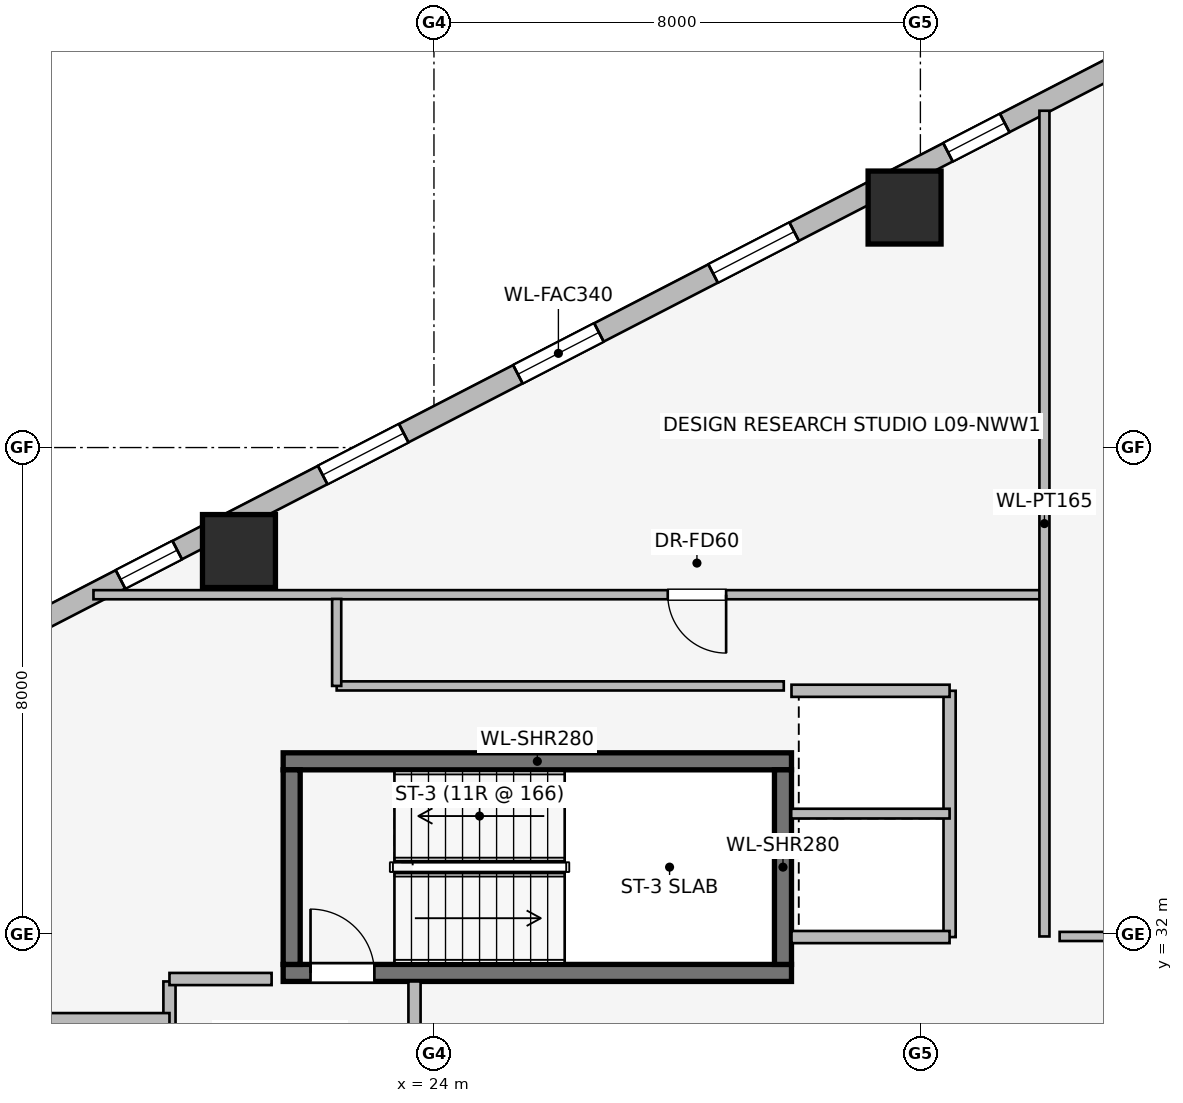
"""IFC4 building model, lengths in metres.
Left out: names, types, materials, properties, quantities, classifications, styles, units other than length and angle.
Written with IfcOpenShell. Run it as: python <this file> out.ifc"""

import sys

from ifc_helpers import new_model, si_unit, direction, frame, frame_2d, origin, origin_2d, place, context, subcontext, project, spatial, rectangle, extrude, element, fill, save


model = new_model("IFC4")
c1 = context("Model", 3, precision=1e-05, world=origin(), true_north=direction((0.0, 1.0)))
c2 = subcontext(c1, "Body", "Model", "MODEL_VIEW")
j1 = project(units=[si_unit("LENGTHUNIT", "METRE"), si_unit("PLANEANGLEUNIT", "RADIAN")], contexts=[c1])
p1 = place(None, origin())
s1 = spatial("IfcSite", under=j1, at=p1, CompositionType="ELEMENT")
p2 = place(p1, origin())
s2 = spatial("IfcBuilding", under=s1, at=p2, CompositionType="ELEMENT")
p3 = place(p2, frame((0.0, 0.0, 37.95)))
s3 = spatial("IfcBuildingStorey", under=s2, at=p3, CompositionType="ELEMENT", Elevation=37.95)
p4 = place(p3, frame((21.52, 31.36, 0.0), z_axis=(0.0, 0.0, 1.0), x_axis=(1.0, 0.0, 0.0)))
e1 = element("IfcWall", 1, at=p4, inside=s3, PredefinedType="SHEAR", context=c2, shape_type="SweptSolid", body=[
    extrude(rectangle(XDim=8.36, YDim=0.28, at=frame_2d((4.18, 0.0))), origin(), (0.0, 0.0, 1.0), 3.65),
])
p5 = place(p4, frame((0.45, 0.0, 0.0)))
e2 = element("IfcOpeningElement", 2, at=p5, cuts=e1, PredefinedType="OPENING", context=c2, shape_type="SweptSolid", body=[
    extrude(rectangle(XDim=1.05, YDim=2.0, at=frame_2d((0.525, 1.0))), frame((0.0, 0.15, 0.0), z_axis=(0.0, -1.0, 0.0), x_axis=(1.0, 0.0, 0.0)), (0.0, 0.0, 1.0), 0.3),
])
p6 = place(p3, frame((29.88, 34.84, 0.0), z_axis=(0.0, 0.0, 1.0), x_axis=(-1.0, 0.0, 0.0)))
e3 = element("IfcWall", 3, at=p6, inside=s3, PredefinedType="SHEAR", context=c2, shape_type="SweptSolid", body=[
    extrude(rectangle(XDim=8.36, YDim=0.28, at=frame_2d((4.18, 0.0))), origin(), (0.0, 0.0, 1.0), 3.65),
])
for number, where, z_axis, x_axis in (
    (4, (21.66, 34.7, 0.0), (0.0, 0.0, 1.0), (0.0, -1.0, 0.0)),
    (5, (29.74, 31.5, 0.0), (0.0, 0.0, 1.0), (0.0, 1.0, 0.0)),
):
    element("IfcWall", number, at=place(p3, frame(where, z_axis=z_axis, x_axis=x_axis)), inside=s3, PredefinedType="SHEAR", context=c2, shape_type="SweptSolid", body=[
        extrude(rectangle(XDim=3.2, YDim=0.28, at=frame_2d((1.6, 0.0))), origin(), (0.0, 0.0, 1.0), 3.65),
    ])
for number, where, z_axis, x_axis in (
    (6, (31.74, 43.947, 0.0), (0.0, 0.0, 1.0), (1.0, 0.0, 0.0)),
    (7, (20.793, 38.298, 0.0), (0.0, 0.0, 1.0), (1.0, 0.0, 0.0)),
):
    element("IfcColumn", number, at=place(p3, frame(where, z_axis=z_axis, x_axis=x_axis)), inside=s3, PredefinedType="COLUMN", context=c2, shape_type="SweptSolid", body=[
        extrude(rectangle(XDim=1.2, YDim=1.2, at=origin_2d()), origin(), (0.0, 0.0, 1.0), 3.65),
    ])
p7 = place(p3, frame((16.924, 36.841, 0.0), z_axis=(0.0, 0.0, 1.0), x_axis=(0.888634413993, 0.458616264721, 0.0)))
e8 = element("IfcWall", 8, at=p7, inside=s3, PredefinedType="STANDARD", context=c2, shape_type="SweptSolid", body=[
    extrude(rectangle(XDim=20.531, YDim=0.34, at=frame_2d((10.266, 0.0))), origin(), (0.0, 0.0, 1.0), 2.684),
])
p8 = place(p7, frame((2.161, 0.0, 0.75)))
e9 = element("IfcOpeningElement", 9, at=p8, cuts=e8, PredefinedType="OPENING", context=c2, shape_type="SweptSolid", body=[
    extrude(rectangle(XDim=1.05, YDim=1.4, at=frame_2d((0.525, 0.7))), frame((0.0, 0.18, 0.0), z_axis=(0.0, -1.0, 0.0), x_axis=(1.0, 0.0, 0.0)), (0.0, 0.0, 1.0), 0.36),
])
p9 = place(p7, frame((5.903, 0.0, 0.75)))
e10 = element("IfcOpeningElement", 10, at=p9, cuts=e8, PredefinedType="OPENING", context=c2, shape_type="SweptSolid", body=[
    extrude(rectangle(XDim=1.5, YDim=1.5, at=frame_2d((0.75, 0.75))), frame((0.0, 0.18, 0.0), z_axis=(0.0, -1.0, 0.0), x_axis=(1.0, 0.0, 0.0)), (0.0, 0.0, 1.0), 0.36),
])
p10 = place(p7, frame((9.516, 0.0, 0.75)))
e11 = element("IfcOpeningElement", 11, at=p10, cuts=e8, PredefinedType="OPENING", context=c2, shape_type="SweptSolid", body=[
    extrude(rectangle(XDim=1.5, YDim=1.5, at=frame_2d((0.75, 0.75))), frame((0.0, 0.18, 0.0), z_axis=(0.0, -1.0, 0.0), x_axis=(1.0, 0.0, 0.0)), (0.0, 0.0, 1.0), 0.36),
])
p11 = place(p7, frame((13.129, 0.0, 0.75)))
e12 = element("IfcOpeningElement", 12, at=p11, cuts=e8, PredefinedType="OPENING", context=c2, shape_type="SweptSolid", body=[
    extrude(rectangle(XDim=1.5, YDim=1.5, at=frame_2d((0.75, 0.75))), frame((0.0, 0.18, 0.0), z_axis=(0.0, -1.0, 0.0), x_axis=(1.0, 0.0, 0.0)), (0.0, 0.0, 1.0), 0.36),
])
p12 = place(p7, frame((17.476, 0.0, 0.75)))
e13 = element("IfcOpeningElement", 13, at=p12, cuts=e8, PredefinedType="OPENING", context=c2, shape_type="SweptSolid", body=[
    extrude(rectangle(XDim=1.05, YDim=1.4, at=frame_2d((0.525, 0.7))), frame((0.0, 0.18, 0.0), z_axis=(0.0, -1.0, 0.0), x_axis=(1.0, 0.0, 0.0)), (0.0, 0.0, 1.0), 0.36),
])
p13 = place(p3, frame((19.65, 25.68, 0.0), z_axis=(0.0, 0.0, 1.0), x_axis=(0.0, 1.0, 0.0)))
e14 = element("IfcWall", 14, at=p13, inside=s3, PredefinedType="PARTITIONING", context=c2, shape_type="SweptSolid", body=[
    extrude(rectangle(XDim=5.54, YDim=0.2, at=frame_2d((2.77, 0.0))), origin(), (0.0, 0.0, 1.0), 3.39),
])
p14 = place(p13, frame((0.62, 0.0, 0.0)))
e15 = element("IfcOpeningElement", 15, at=p14, cuts=e14, PredefinedType="OPENING", context=c2, shape_type="SweptSolid", body=[
    extrude(rectangle(XDim=1.1, YDim=2.2, at=frame_2d((0.55, 1.1))), frame((0.0, 0.11, 0.0), z_axis=(0.0, -1.0, 0.0), x_axis=(1.0, 0.0, 0.0)), (0.0, 0.0, 1.0), 0.22),
])
p15 = place(p13, frame((3.12, 0.0, 0.0)))
e16 = element("IfcOpeningElement", 16, at=p15, cuts=e14, PredefinedType="OPENING", context=c2, shape_type="SweptSolid", body=[
    extrude(rectangle(XDim=1.1, YDim=2.2, at=frame_2d((0.55, 1.1))), frame((0.0, 0.11, 0.0), z_axis=(0.0, -1.0, 0.0), x_axis=(1.0, 0.0, 0.0)), (0.0, 0.0, 1.0), 0.22),
])
p16 = place(p3, frame((23.68, 25.68, 0.0), z_axis=(0.0, 0.0, 1.0), x_axis=(0.0, 1.0, 0.0)))
e17 = element("IfcWall", 17, at=p16, inside=s3, PredefinedType="PARTITIONING", context=c2, shape_type="SweptSolid", body=[
    extrude(rectangle(XDim=5.54, YDim=0.2, at=frame_2d((2.77, 0.0))), origin(), (0.0, 0.0, 1.0), 3.39),
])
p17 = place(p16, frame((1.8, 0.0, 0.0)))
e18 = element("IfcOpeningElement", 18, at=p17, cuts=e17, PredefinedType="OPENING", context=c2, shape_type="SweptSolid", body=[
    extrude(rectangle(XDim=1.05, YDim=2.0, at=frame_2d((0.525, 1.0))), frame((0.0, 0.11, 0.0), z_axis=(0.0, -1.0, 0.0), x_axis=(1.0, 0.0, 0.0)), (0.0, 0.0, 1.0), 0.22),
])
p18 = place(p3, frame((21.33, 31.26, 0.0), z_axis=(0.0, 0.0, 1.0), x_axis=(-1.0, 0.0, 0.0)))
e19 = element("IfcWall", 19, at=p18, inside=s3, PredefinedType="PARTITIONING", context=c2, shape_type="SweptSolid", body=[
    extrude(rectangle(XDim=1.68, YDim=0.2, at=frame_2d((0.84, 0.0))), origin(), (0.0, 0.0, 1.0), 3.39),
])
p19 = place(p3, frame((19.65, 30.6, 0.0), z_axis=(0.0, 0.0, 1.0), x_axis=(-1.0, 0.0, 0.0)))
e20 = element("IfcWall", 20, at=p19, inside=s3, PredefinedType="PARTITIONING", context=c2, shape_type="SweptSolid", body=[
    extrude(rectangle(XDim=2.5, YDim=0.2, at=frame_2d((1.25, 0.0))), origin(), (0.0, 0.0, 1.0), 2.29),
])
p20 = place(p3, frame((32.48, 31.95, 0.0), z_axis=(0.0, 0.0, 1.0), x_axis=(0.0, 1.0, 0.0)))
e21 = element("IfcWall", 21, at=p20, inside=s3, PredefinedType="PARTITIONING", context=c2, shape_type="SweptSolid", body=[
    extrude(rectangle(XDim=4.05, YDim=0.2, at=frame_2d((2.025, 0.0))), origin(), (0.0, 0.0, 1.0), 2.513),
])
for number, where, z_axis, x_axis in (
    (22, (29.88, 36.0, 0.0), (0.0, 0.0, 1.0), (1.0, 0.0, 0.0)),
    (23, (32.48, 31.95, 0.0), (0.0, 0.0, 1.0), (-1.0, 0.0, 0.0)),
):
    element("IfcWall", number, at=place(p3, frame(where, z_axis=z_axis, x_axis=x_axis)), inside=s3, PredefinedType="PARTITIONING", context=c2, shape_type="SweptSolid", body=[
        extrude(rectangle(XDim=2.6, YDim=0.2, at=frame_2d((1.3, 0.0))), origin(), (0.0, 0.0, 1.0), 3.39),
    ])
p21 = place(p3, frame((29.875, 33.98, 0.0), z_axis=(0.0, 0.0, 1.0), x_axis=(1.0, 0.0, 0.0)))
e24 = element("IfcWall", 24, at=p21, inside=s3, PredefinedType="PARTITIONING", context=c2, shape_type="SweptSolid", body=[
    extrude(rectangle(XDim=2.605, YDim=0.16, at=frame_2d((1.302, 0.0))), origin(), (0.0, 0.0, 1.0), 3.39),
])
p22 = place(p3, frame((34.0, 37.58, 0.0), z_axis=(0.0, 0.0, 1.0), x_axis=(-1.0, 0.0, 0.0)))
e25 = element("IfcWall", 25, at=p22, inside=s3, PredefinedType="PARTITIONING", context=c2, shape_type="SweptSolid", body=[
    extrude(rectangle(XDim=15.6, YDim=0.15, at=frame_2d((7.8, 0.0))), origin(), (0.0, 0.0, 1.0), 3.39),
])
p23 = place(p22, frame((5.195, 0.0, 0.0)))
e26 = element("IfcOpeningElement", 26, at=p23, cuts=e25, PredefinedType="OPENING", context=c2, shape_type="SweptSolid", body=[
    extrude(rectangle(XDim=0.96, YDim=2.0, at=frame_2d((0.48, 1.0))), frame((0.0, 0.085, 0.0), z_axis=(0.0, -1.0, 0.0), x_axis=(1.0, 0.0, 0.0)), (0.0, 0.0, 1.0), 0.17),
])
p24 = place(p3, frame((34.04, 31.96, 0.0), z_axis=(0.0, 0.0, 1.0), x_axis=(0.0, 1.0, 0.0)))
e27 = element("IfcWall", 27, at=p24, inside=s3, PredefinedType="PARTITIONING", context=c2, shape_type="SweptSolid", body=[
    extrude(rectangle(XDim=13.579, YDim=0.165, at=frame_2d((6.79, 0.0))), origin(), (0.0, 0.0, 1.0), 3.39),
])
p25 = place(p3, frame((44.428, 31.96, 0.0), z_axis=(0.0, 0.0, 1.0), x_axis=(-1.0, 0.0, 0.0)))
e28 = element("IfcWall", 28, at=p25, inside=s3, PredefinedType="PARTITIONING", context=c2, shape_type="SweptSolid", body=[
    extrude(rectangle(XDim=10.138, YDim=0.15, at=frame_2d((5.069, 0.0))), origin(), (0.0, 0.0, 1.0), 3.39),
])
p26 = place(p25, frame((4.47, 0.0, 0.0)))
e29 = element("IfcOpeningElement", 29, at=p26, cuts=e28, PredefinedType="OPENING", context=c2, shape_type="SweptSolid", body=[
    extrude(rectangle(XDim=0.96, YDim=2.0, at=frame_2d((0.48, 1.0))), frame((0.0, 0.085, 0.0), z_axis=(0.0, -1.0, 0.0), x_axis=(1.0, 0.0, 0.0)), (0.0, 0.0, 1.0), 0.17),
])
p27 = place(p3, frame((29.753, 36.08, 0.0), z_axis=(0.0, 0.0, 1.0), x_axis=(-1.0, 0.0, 0.0)))
e30 = element("IfcWall", 30, at=p27, inside=s3, PredefinedType="PARTITIONING", context=c2, shape_type="SweptSolid", body=[
    extrude(rectangle(XDim=7.353, YDim=0.15, at=frame_2d((3.677, 0.0))), origin(), (0.0, 0.0, 1.0), 3.39),
])
p28 = place(p3, frame((22.4, 36.08, 0.0), z_axis=(0.0, 0.0, 1.0), x_axis=(0.0, 1.0, 0.0)))
e31 = element("IfcWall", 31, at=p28, inside=s3, PredefinedType="PARTITIONING", context=c2, shape_type="SweptSolid", body=[
    extrude(rectangle(XDim=1.43, YDim=0.15, at=frame_2d((0.715, 0.0))), origin(), (0.0, 0.0, 1.0), 3.39),
])
p29 = place(p8, origin())
e32 = element("IfcWindow", 32, at=p29, inside=s3, PartitioningType="SINGLE_PANEL", PredefinedType="WINDOW", context=c2, shape_type="SweptSolid", body=[
    extrude(rectangle(XDim=1.05, YDim=1.4, at=frame_2d((0.525, 0.7))), frame((0.0, 0.03, 0.0), z_axis=(0.0, -1.0, 0.0), x_axis=(1.0, 0.0, 0.0)), (0.0, 0.0, 1.0), 0.06),
])
fill(e9, e32)
p30 = place(p9, origin())
e33 = element("IfcWindow", 33, at=p30, inside=s3, PartitioningType="SINGLE_PANEL", PredefinedType="WINDOW", context=c2, shape_type="SweptSolid", body=[
    extrude(rectangle(XDim=1.5, YDim=1.5, at=frame_2d((0.75, 0.75))), frame((0.0, 0.03, 0.0), z_axis=(0.0, -1.0, 0.0), x_axis=(1.0, 0.0, 0.0)), (0.0, 0.0, 1.0), 0.06),
])
fill(e10, e33)
p31 = place(p10, origin())
e34 = element("IfcWindow", 34, at=p31, inside=s3, PartitioningType="SINGLE_PANEL", PredefinedType="WINDOW", context=c2, shape_type="SweptSolid", body=[
    extrude(rectangle(XDim=1.5, YDim=1.5, at=frame_2d((0.75, 0.75))), frame((0.0, 0.03, 0.0), z_axis=(0.0, -1.0, 0.0), x_axis=(1.0, 0.0, 0.0)), (0.0, 0.0, 1.0), 0.06),
])
fill(e11, e34)
p32 = place(p11, origin())
e35 = element("IfcWindow", 35, at=p32, inside=s3, PartitioningType="SINGLE_PANEL", PredefinedType="WINDOW", context=c2, shape_type="SweptSolid", body=[
    extrude(rectangle(XDim=1.5, YDim=1.5, at=frame_2d((0.75, 0.75))), frame((0.0, 0.03, 0.0), z_axis=(0.0, -1.0, 0.0), x_axis=(1.0, 0.0, 0.0)), (0.0, 0.0, 1.0), 0.06),
])
fill(e12, e35)
p33 = place(p12, origin())
e36 = element("IfcWindow", 36, at=p33, inside=s3, PartitioningType="SINGLE_PANEL", PredefinedType="WINDOW", context=c2, shape_type="SweptSolid", body=[
    extrude(rectangle(XDim=1.05, YDim=1.4, at=frame_2d((0.525, 0.7))), frame((0.0, 0.03, 0.0), z_axis=(0.0, -1.0, 0.0), x_axis=(1.0, 0.0, 0.0)), (0.0, 0.0, 1.0), 0.06),
])
fill(e13, e36)
p34 = place(p5, origin())
e37 = element("IfcDoor", 37, at=p34, inside=s3, OperationType="SINGLE_SWING_LEFT", PredefinedType="DOOR", context=c2, shape_type="SweptSolid", body=[
    extrude(rectangle(XDim=1.05, YDim=2.0, at=frame_2d((0.525, 1.0))), frame((0.0, 0.025, 0.0), z_axis=(0.0, -1.0, 0.0), x_axis=(1.0, 0.0, 0.0)), (0.0, 0.0, 1.0), 0.05),
])
fill(e2, e37)
p35 = place(p23, origin())
e38 = element("IfcDoor", 38, at=p35, inside=s3, OperationType="SINGLE_SWING_LEFT", PredefinedType="DOOR", context=c2, shape_type="SweptSolid", body=[
    extrude(rectangle(XDim=0.96, YDim=2.0, at=frame_2d((0.48, 1.0))), frame((0.0, 0.025, 0.0), z_axis=(0.0, -1.0, 0.0), x_axis=(1.0, 0.0, 0.0)), (0.0, 0.0, 1.0), 0.05),
])
fill(e26, e38)
save(model, sys.argv[1])
